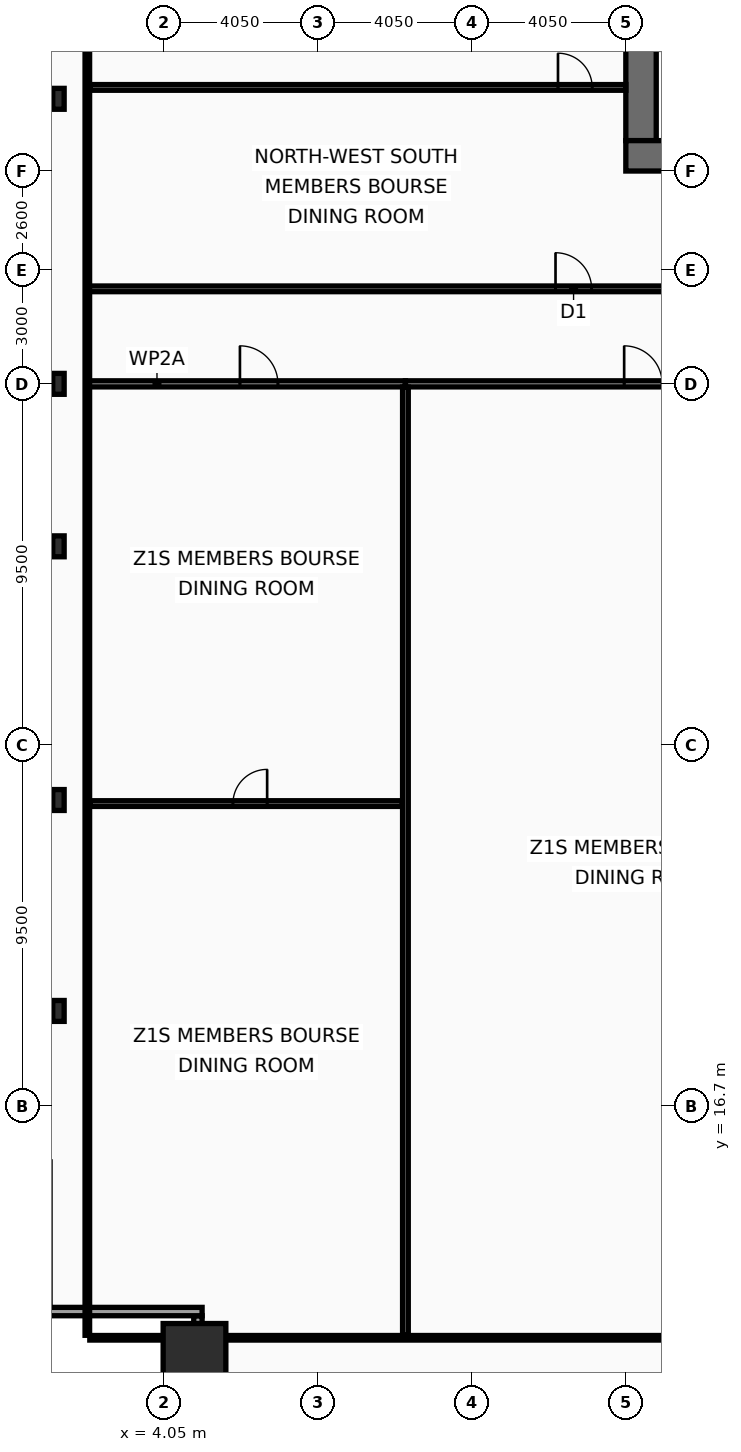
"""IFC4 building model, lengths in metres.
Left out: names, types, materials, properties, quantities, classifications, styles, units other than length and angle.
Written with IfcOpenShell. Run it as: python <this file> out.ifc"""

import sys

from ifc_helpers import new_model, si_unit, direction, frame, frame_2d, origin, origin_2d, place, context, subcontext, project, spatial, rectangle, hollow_rectangle, i_section, extrude, element, fill, save


model = new_model("IFC4")
c1 = context("Model", 3, precision=1e-05, world=origin(), true_north=direction((0.0, 1.0)))
c2 = subcontext(c1, "Body", "Model", "MODEL_VIEW")
j1 = project(units=[si_unit("LENGTHUNIT", "METRE"), si_unit("PLANEANGLEUNIT", "RADIAN")], contexts=[c1])
p1 = place(None, origin())
s1 = spatial("IfcSite", under=j1, at=p1, CompositionType="ELEMENT")
p2 = place(p1, origin())
s2 = spatial("IfcBuilding", under=s1, at=p2, CompositionType="ELEMENT")
p3 = place(p2, frame((0.0, 0.0, 49.8)))
s3 = spatial("IfcBuildingStorey", under=s2, at=p3, CompositionType="ELEMENT", Elevation=49.8)
p4 = place(p3, frame((16.6, 42.1, 0.0), z_axis=(0.0, 0.0, 1.0), x_axis=(0.0, 1.0, 0.0)))
e1 = element("IfcWall", 1, at=p4, inside=s3, PredefinedType="SHEAR", context=c2, shape_type="SweptSolid", body=[
    extrude(rectangle(XDim=10.8, YDim=0.8, at=frame_2d((5.4, 0.0))), origin(), (0.0, 0.0, 1.0), 3.82),
])
p5 = place(p3, frame((18.65, 41.7, 0.0), z_axis=(0.0, 0.0, 1.0), x_axis=(-1.0, 0.0, 0.0)))
e2 = element("IfcWall", 2, at=p5, inside=s3, PredefinedType="SHEAR", context=c2, shape_type="SweptSolid", body=[
    extrude(rectangle(XDim=2.45, YDim=0.8, at=frame_2d((1.225, 0.0))), origin(), (0.0, 0.0, 1.0), 3.82),
])
p6 = place(p3, frame((4.85, 10.15, 0.0), z_axis=(0.0, 0.0, 1.0), x_axis=(1.0, 0.0, 0.0)))
e3 = element("IfcColumn", 3, at=p6, inside=s3, PredefinedType="COLUMN", context=c2, shape_type="SweptSolid", body=[
    extrude(hollow_rectangle(XDim=1.65, YDim=1.65, WallThickness=0.075, at=origin_2d()), origin(), (0.0, 0.0, 1.0), 4.0),
])
for number, where, z_axis, x_axis in (
    (4, (1.27, 19.2, 0.0), (0.0, 0.0, 1.0), (1.0, 0.0, 0.0)),
    (5, (1.27, 24.75, 0.0), (0.0, 0.0, 1.0), (1.0, 0.0, 0.0)),
    (6, (1.27, 31.425, 0.0), (0.0, 0.0, 1.0), (1.0, 0.0, 0.0)),
    (7, (1.27, 35.7, 0.0), (0.0, 0.0, 1.0), (1.0, 0.0, 0.0)),
    (8, (1.27, 43.2, 0.0), (0.0, 0.0, 1.0), (1.0, 0.0, 0.0)),
):
    element("IfcColumn", number, at=place(p3, frame(where, z_axis=z_axis, x_axis=x_axis)), inside=s3, PredefinedType="COLUMN", context=c2, shape_type="SweptSolid", body=[
        extrude(i_section(OverallWidth=0.3, OverallDepth=0.55, WebThickness=0.015, FlangeThickness=0.029, at=origin_2d()), origin(), (0.0, 0.0, 1.0), 4.0),
    ])
p7 = place(p3, frame((4.94, 7.27, 0.0), z_axis=(0.0, 0.0, 1.0), x_axis=(0.0, 1.0, 0.0)))
e9 = element("IfcWall", 9, at=p7, inside=s3, PredefinedType="SOLIDWALL", context=c2, shape_type="SweptSolid", body=[
    extrude(rectangle(XDim=3.91, YDim=0.22, at=frame_2d((1.955, 0.0))), origin(), (0.0, 0.0, 1.0), 3.16),
])
p8 = place(p3, frame((5.05, 11.29, 0.0), z_axis=(0.0, 0.0, 1.0), x_axis=(-1.0, 0.0, 0.0)))
e10 = element("IfcWall", 10, at=p8, inside=s3, PredefinedType="SOLIDWALL", context=c2, shape_type="SweptSolid", body=[
    extrude(rectangle(XDim=4.22, YDim=0.22, at=frame_2d((2.11, 0.0))), origin(), (0.0, 0.0, 1.0), 3.16),
])
p9 = place(p3, frame((2.03, 38.2, 0.0), z_axis=(0.0, 0.0, 1.0), x_axis=(1.0, 0.0, 0.0)))
e11 = element("IfcWall", 11, at=p9, inside=s3, PredefinedType="PARTITIONING", context=c2, shape_type="SweptSolid", body=[
    extrude(rectangle(XDim=16.52, YDim=0.15, at=frame_2d((8.26, 0.0))), origin(), (0.0, 0.0, 1.0), 3.01),
])
p10 = place(p9, frame((12.32, 0.0, 0.0)))
e12 = element("IfcOpeningElement", 12, at=p10, cuts=e11, PredefinedType="OPENING", context=c2, shape_type="SweptSolid", body=[
    extrude(rectangle(XDim=0.95, YDim=2.05, at=frame_2d((0.475, 1.025))), frame((0.0, 0.085, 0.0), z_axis=(0.0, -1.0, 0.0), x_axis=(1.0, 0.0, 0.0)), (0.0, 0.0, 1.0), 0.17),
])
p11 = place(p3, frame((2.095, 43.5, 0.0), z_axis=(0.0, 0.0, 1.0), x_axis=(1.0, 0.0, 0.0)))
e13 = element("IfcWall", 13, at=p11, inside=s3, PredefinedType="PARTITIONING", context=c2, shape_type="SweptSolid", body=[
    extrude(rectangle(XDim=14.105, YDim=0.15, at=frame_2d((7.052, 0.0))), origin(), (0.0, 0.0, 1.0), 3.01),
])
p12 = place(p11, frame((12.32, 0.0, 0.0)))
e14 = element("IfcOpeningElement", 14, at=p12, cuts=e13, PredefinedType="OPENING", context=c2, shape_type="SweptSolid", body=[
    extrude(rectangle(XDim=0.9, YDim=2.05, at=frame_2d((0.45, 1.025))), frame((0.0, 0.085, 0.0), z_axis=(0.0, -1.0, 0.0), x_axis=(1.0, 0.0, 0.0)), (0.0, 0.0, 1.0), 0.17),
])
p13 = place(p3, frame((2.03, 35.7, 0.0), z_axis=(0.0, 0.0, 1.0), x_axis=(1.0, 0.0, 0.0)))
e15 = element("IfcWall", 15, at=p13, inside=s3, PredefinedType="PARTITIONING", context=c2, shape_type="SweptSolid", body=[
    extrude(rectangle(XDim=8.37, YDim=0.16, at=frame_2d((4.185, 0.0))), origin(), (0.0, 0.0, 1.0), 3.01),
])
p14 = place(p13, frame((4.016, 0.0, 0.0)))
e16 = element("IfcOpeningElement", 16, at=p14, cuts=e15, PredefinedType="OPENING", context=c2, shape_type="SweptSolid", body=[
    extrude(rectangle(XDim=1.0, YDim=2.05, at=frame_2d((0.5, 1.025))), frame((0.0, 0.09, 0.0), z_axis=(0.0, -1.0, 0.0), x_axis=(1.0, 0.0, 0.0)), (0.0, 0.0, 1.0), 0.18),
])
p15 = place(p3, frame((2.095, 24.656, 0.0), z_axis=(0.0, 0.0, 1.0), x_axis=(1.0, 0.0, 0.0)))
e17 = element("IfcWall", 17, at=p15, inside=s3, PredefinedType="PARTITIONING", context=c2, shape_type="SweptSolid", body=[
    extrude(rectangle(XDim=8.225, YDim=0.15, at=frame_2d((4.113, 0.0))), origin(), (0.0, 0.0, 1.0), 3.82),
])
p16 = place(p15, frame((3.767, 0.0, 0.0)))
e18 = element("IfcOpeningElement", 18, at=p16, cuts=e17, PredefinedType="OPENING", context=c2, shape_type="SweptSolid", body=[
    extrude(rectangle(XDim=0.9, YDim=2.05, at=frame_2d((0.45, 1.025))), frame((0.0, 0.085, 0.0), z_axis=(0.0, -1.0, 0.0), x_axis=(1.0, 0.0, 0.0)), (0.0, 0.0, 1.0), 0.17),
])
p17 = place(p3, frame((10.4, 35.7, 0.0), z_axis=(0.0, 0.0, 1.0), x_axis=(1.0, 0.0, 0.0)))
e19 = element("IfcWall", 19, at=p17, inside=s3, PredefinedType="PARTITIONING", context=c2, shape_type="SweptSolid", body=[
    extrude(rectangle(XDim=12.514, YDim=0.16, at=frame_2d((6.257, 0.0))), origin(), (0.0, 0.0, 1.0), 3.01),
])
p18 = place(p17, frame((5.756, 0.0, 0.0)))
e20 = element("IfcOpeningElement", 20, at=p18, cuts=e19, PredefinedType="OPENING", context=c2, shape_type="SweptSolid", body=[
    extrude(rectangle(XDim=1.0, YDim=2.05, at=frame_2d((0.5, 1.025))), frame((0.0, 0.09, 0.0), z_axis=(0.0, -1.0, 0.0), x_axis=(1.0, 0.0, 0.0)), (0.0, 0.0, 1.0), 0.18),
])
p19 = place(p3, frame((10.4, 10.665, 0.0), z_axis=(0.0, 0.0, 1.0), x_axis=(0.0, 1.0, 0.0)))
e21 = element("IfcWall", 21, at=p19, inside=s3, PredefinedType="PARTITIONING", context=c2, shape_type="SweptSolid", body=[
    extrude(rectangle(XDim=24.95, YDim=0.15, at=frame_2d((12.475, 0.0))), origin(), (0.0, 0.0, 1.0), 3.01),
])
p20 = place(p3, frame((2.03, 10.665, 0.0), z_axis=(0.0, 0.0, 1.0), x_axis=(0.0, 1.0, 0.0)))
e22 = element("IfcWall", 22, at=p20, inside=s3, PredefinedType="PARTITIONING", context=c2, shape_type="SweptSolid", body=[
    extrude(rectangle(XDim=42.11, YDim=0.12, at=frame_2d((21.055, 0.0))), origin(), (0.0, 0.0, 1.0), 3.01),
])
p21 = place(p3, frame((2.095, 10.6, 0.0), z_axis=(0.0, 0.0, 1.0), x_axis=(1.0, 0.0, 0.0)))
e23 = element("IfcWall", 23, at=p21, inside=s3, PredefinedType="PARTITIONING", context=c2, shape_type="SweptSolid", body=[
    extrude(rectangle(XDim=68.71, YDim=0.12, at=frame_2d((34.355, 0.0))), origin(), (0.0, 0.0, 1.0), 3.01),
])
p22 = place(p10, origin())
e24 = element("IfcDoor", 24, at=p22, inside=s3, OperationType="SINGLE_SWING_LEFT", PredefinedType="DOOR", context=c2, shape_type="SweptSolid", body=[
    extrude(rectangle(XDim=0.95, YDim=2.05, at=frame_2d((0.475, 1.025))), frame((0.0, 0.025, 0.0), z_axis=(0.0, -1.0, 0.0), x_axis=(1.0, 0.0, 0.0)), (0.0, 0.0, 1.0), 0.05),
])
fill(e12, e24)
p23 = place(p12, origin())
e25 = element("IfcDoor", 25, at=p23, inside=s3, OperationType="SINGLE_SWING_LEFT", PredefinedType="DOOR", context=c2, shape_type="SweptSolid", body=[
    extrude(rectangle(XDim=0.9, YDim=2.05, at=frame_2d((0.45, 1.025))), frame((0.0, 0.025, 0.0), z_axis=(0.0, -1.0, 0.0), x_axis=(1.0, 0.0, 0.0)), (0.0, 0.0, 1.0), 0.05),
])
fill(e14, e25)
p24 = place(p14, origin())
e26 = element("IfcDoor", 26, at=p24, inside=s3, OperationType="SINGLE_SWING_LEFT", PredefinedType="DOOR", context=c2, shape_type="SweptSolid", body=[
    extrude(rectangle(XDim=1.0, YDim=2.05, at=frame_2d((0.5, 1.025))), frame((0.0, 0.025, 0.0), z_axis=(0.0, -1.0, 0.0), x_axis=(1.0, 0.0, 0.0)), (0.0, 0.0, 1.0), 0.05),
])
fill(e16, e26)
p25 = place(p16, origin())
e27 = element("IfcDoor", 27, at=p25, inside=s3, OperationType="SINGLE_SWING_RIGHT", PredefinedType="DOOR", context=c2, shape_type="SweptSolid", body=[
    extrude(rectangle(XDim=0.9, YDim=2.05, at=frame_2d((0.45, 1.025))), frame((0.0, 0.025, 0.0), z_axis=(0.0, -1.0, 0.0), x_axis=(1.0, 0.0, 0.0)), (0.0, 0.0, 1.0), 0.05),
])
fill(e18, e27)
p26 = place(p18, origin())
e28 = element("IfcDoor", 28, at=p26, inside=s3, OperationType="SINGLE_SWING_LEFT", PredefinedType="DOOR", context=c2, shape_type="SweptSolid", body=[
    extrude(rectangle(XDim=1.0, YDim=2.05, at=frame_2d((0.5, 1.025))), frame((0.0, 0.025, 0.0), z_axis=(0.0, -1.0, 0.0), x_axis=(1.0, 0.0, 0.0)), (0.0, 0.0, 1.0), 0.05),
])
fill(e20, e28)
save(model, sys.argv[1])
